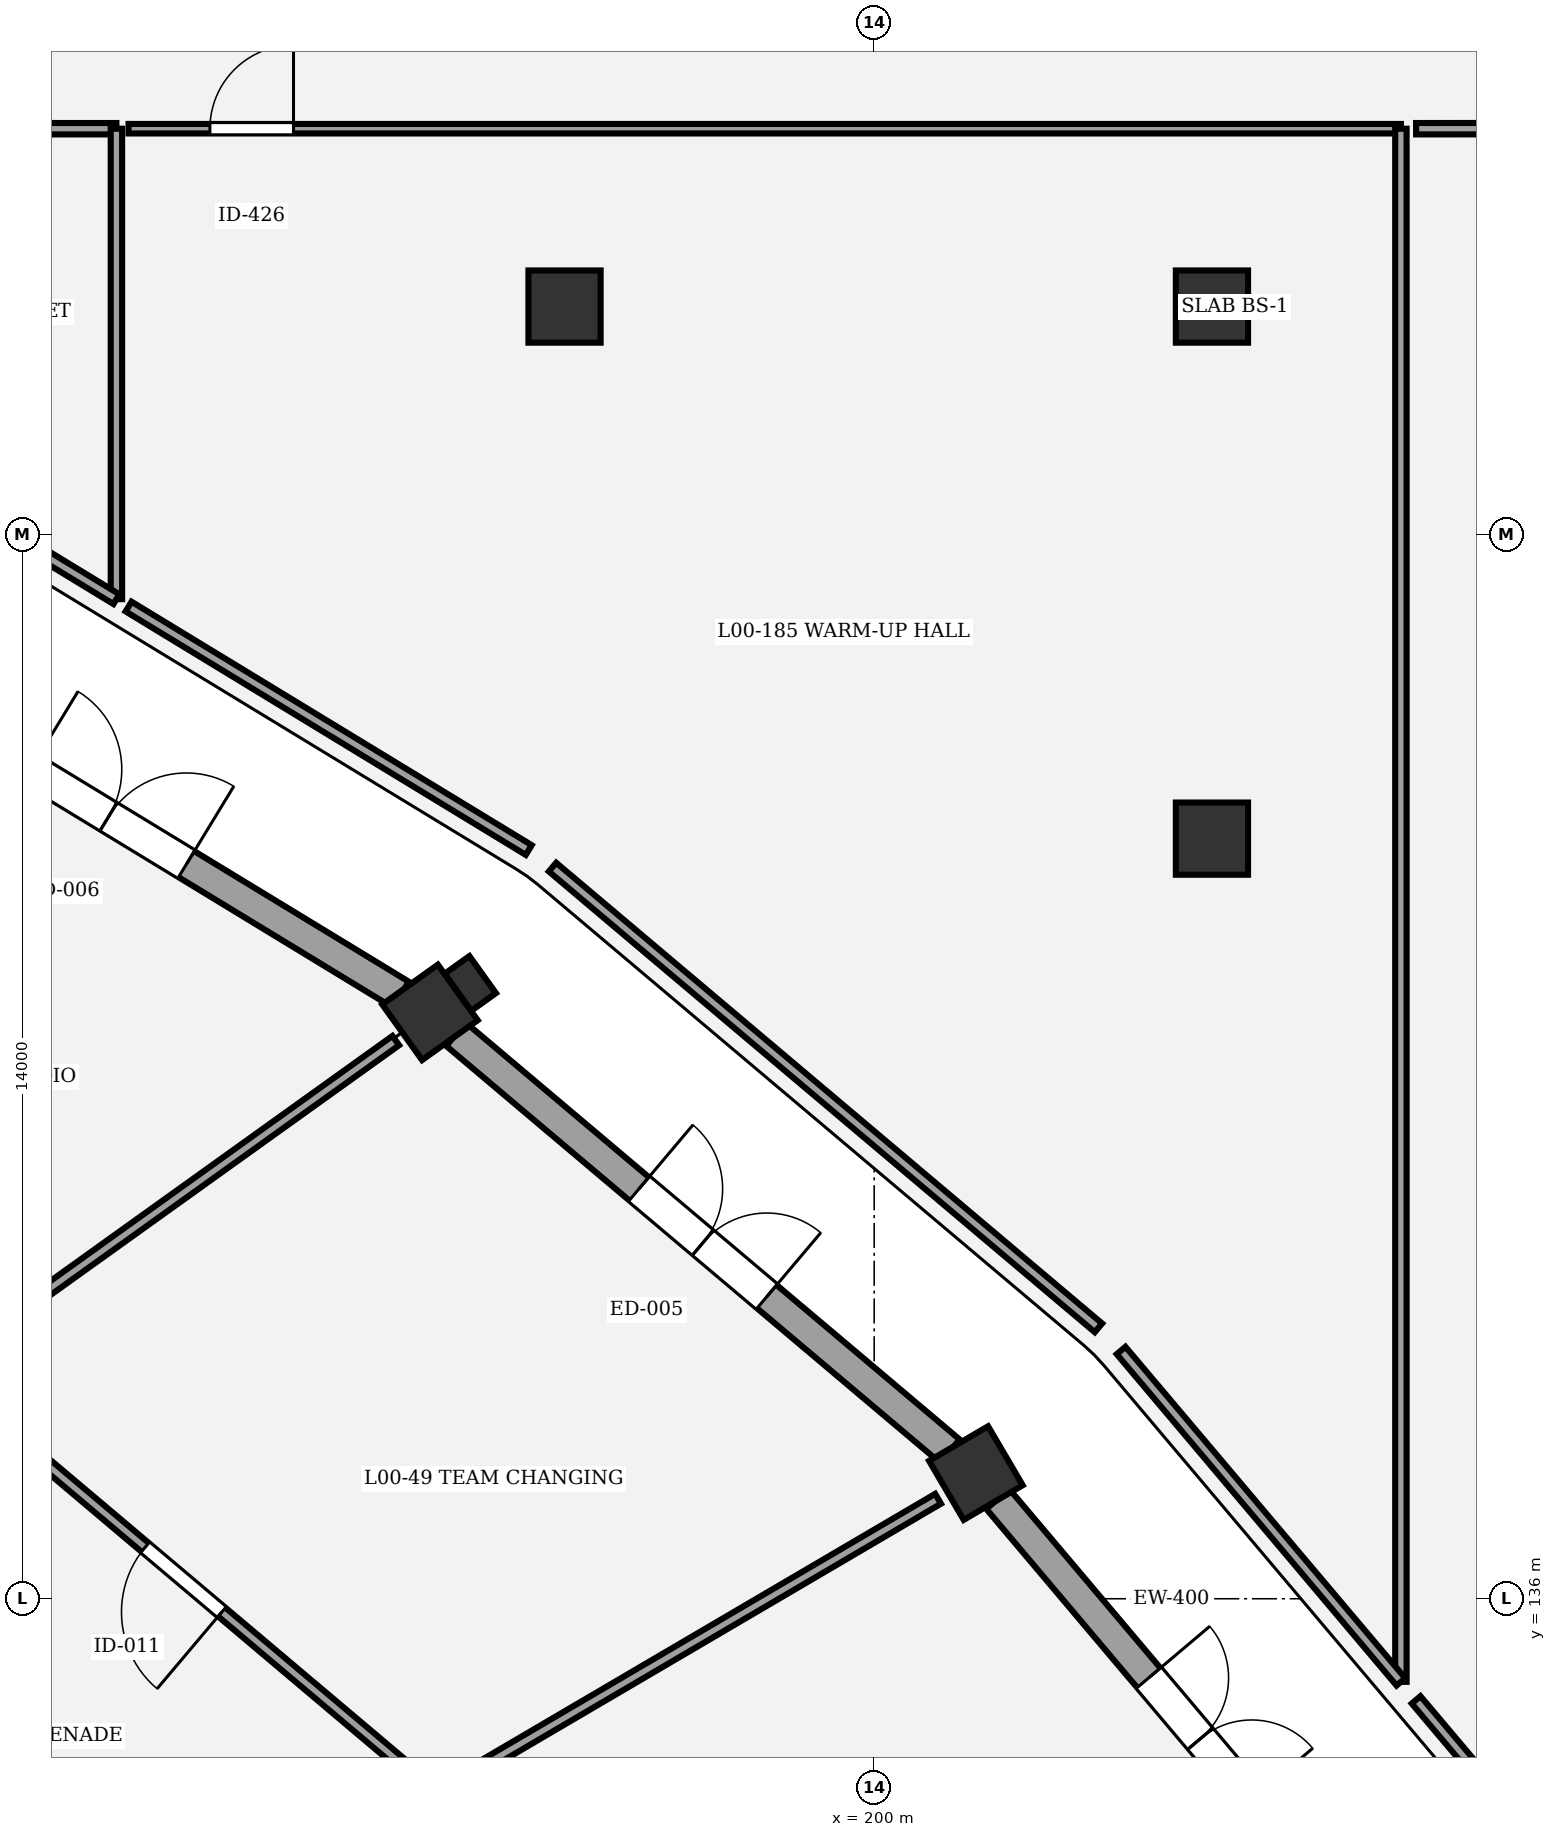
"""IFC4 building model, lengths in metres.
Left out: names, types, materials, properties, quantities, classifications, styles, units other than length and angle.
Written with IfcOpenShell. Run it as: python <this file> out.ifc"""

import sys

from ifc_helpers import new_model, si_unit, direction, frame, frame_2d, origin, origin_2d, place, context, subcontext, project, spatial, rectangle, circle, extrude, element, fill, save


model = new_model("IFC4")
c1 = context("Model", 3, precision=1e-05, world=origin(), true_north=direction((0.0, 1.0)))
c2 = subcontext(c1, "Body", "Model", "MODEL_VIEW")
j1 = project(units=[si_unit("LENGTHUNIT", "METRE"), si_unit("PLANEANGLEUNIT", "RADIAN")], contexts=[c1])
p1 = place(None, origin())
s1 = spatial("IfcSite", under=j1, at=p1, CompositionType="ELEMENT")
p2 = place(p1, origin())
s2 = spatial("IfcBuilding", under=s1, at=p2, CompositionType="ELEMENT")
p3 = place(p2, origin())
s3 = spatial("IfcBuildingStorey", under=s2, at=p3, CompositionType="ELEMENT", Elevation=0.0)
for number, where, z_axis, x_axis in (
    (1, (201.338, 137.654, 0.0), (0.0, 0.0, 1.0), (0.863, 0.506, 0.0)),
    (2, (194.156, 143.715, 0.0), (0.0, 0.0, 1.0), (0.813, 0.582, 0.0)),
):
    element("IfcColumn", number, at=place(p3, frame(where, z_axis=z_axis, x_axis=x_axis)), inside=s3, PredefinedType="COLUMN", context=c2, shape_type="SweptSolid", body=[
        extrude(rectangle(XDim=0.9, YDim=0.9, at=origin_2d()), origin(), (0.0, 0.0, 1.0), 5.4),
    ])
p4 = place(p3, frame((194.686, 144.095, 0.0), z_axis=(0.0, 0.0, 1.0), x_axis=(-0.582406760395, 0.812897512265, 0.0)))
e3 = element("IfcColumn", 3, at=p4, inside=s3, PredefinedType="PILASTER", context=c2, shape_type="SweptSolid", body=[
    extrude(rectangle(XDim=0.6, YDim=0.4, at=origin_2d()), origin(), (0.0, 0.0, 1.0), 5.4),
])
for number, where, z_axis, x_axis in (
    (4, (195.926, 153.0, 0.0), (0.0, 0.0, 1.0), (1.0, 0.0, 0.0)),
    (5, (204.444, 146.0, 0.0), (0.0, 0.0, 1.0), (1.0, 0.0, 0.0)),
    (6, (204.444, 153.0, 0.0), (0.0, 0.0, 1.0), (1.0, 0.0, 0.0)),
):
    element("IfcColumn", number, at=place(p3, frame(where, z_axis=z_axis, x_axis=x_axis)), inside=s3, PredefinedType="COLUMN", context=c2, shape_type="SweptSolid", body=[
        extrude(circle(Radius=0.475, at=origin_2d()), origin(), (0.0, 0.0, 1.0), 5.4),
    ])
p5 = place(p3, frame((201.627, 137.311, 0.0), z_axis=(0.0, 0.0, 1.0), x_axis=(0.645194244502, -0.764018577563, 0.0)))
e7 = element("IfcWall", 7, at=p5, inside=s3, PredefinedType="STANDARD", context=c2, shape_type="SweptSolid", body=[
    extrude(rectangle(XDim=8.256, YDim=0.4, at=frame_2d((4.128, 0.0))), origin(), (0.0, 0.0, 1.0), 4.25),
])
p6 = place(p5, frame((3.078, 0.0, 0.0)))
e8 = element("IfcOpeningElement", 8, at=p6, cuts=e7, PredefinedType="OPENING", context=c2, shape_type="SweptSolid", body=[
    extrude(rectangle(XDim=2.1, YDim=2.45, at=frame_2d((1.05, 1.225))), frame((0.0, 0.21, 0.0), z_axis=(0.0, -1.0, 0.0), x_axis=(1.0, 0.0, 0.0)), (0.0, 0.0, 1.0), 0.42),
])
p7 = place(p3, frame((194.498, 143.426, 0.0), z_axis=(0.0, 0.0, 1.0), x_axis=(0.764254773348, -0.644914445035, 0.0)))
e9 = element("IfcWall", 9, at=p7, inside=s3, PredefinedType="STANDARD", context=c2, shape_type="SweptSolid", body=[
    extrude(rectangle(XDim=8.502, YDim=0.4, at=frame_2d((4.251, 0.0))), origin(), (0.0, 0.0, 1.0), 4.25),
])
p8 = place(p7, frame((3.151, 0.0, 0.0)))
e10 = element("IfcOpeningElement", 10, at=p8, cuts=e9, PredefinedType="OPENING", context=c2, shape_type="SweptSolid", body=[
    extrude(rectangle(XDim=2.2, YDim=2.5, at=frame_2d((1.1, 1.25))), frame((0.0, 0.21, 0.0), z_axis=(0.0, -1.0, 0.0), x_axis=(1.0, 0.0, 0.0)), (0.0, 0.0, 1.0), 0.42),
])
p9 = place(p3, frame((186.079, 148.628, 0.0), z_axis=(0.0, 0.0, 1.0), x_axis=(0.854319454423, -0.519748275413, 0.0)))
e11 = element("IfcWall", 11, at=p9, inside=s3, PredefinedType="STANDARD", context=c2, shape_type="SweptSolid", body=[
    extrude(rectangle(XDim=9.006, YDim=0.4, at=frame_2d((4.503, 0.0))), origin(), (0.0, 0.0, 1.0), 4.25),
])
p10 = place(p9, frame((3.303, 0.0, 0.0)))
e12 = element("IfcOpeningElement", 12, at=p10, cuts=e11, PredefinedType="OPENING", context=c2, shape_type="SweptSolid", body=[
    extrude(rectangle(XDim=2.4, YDim=2.55, at=frame_2d((1.2, 1.275))), frame((0.0, 0.21, 0.0), z_axis=(0.0, -1.0, 0.0), x_axis=(1.0, 0.0, 0.0)), (0.0, 0.0, 1.0), 0.42),
])
p11 = place(p3, frame((194.175, 133.497, 0.0), z_axis=(0.0, 0.0, 1.0), x_axis=(-0.764257572309, 0.644911128117, 0.0)))
e13 = element("IfcWall", 13, at=p11, inside=s3, PredefinedType="PARTITIONING", context=c2, shape_type="SweptSolid", body=[
    extrude(rectangle(XDim=8.539, YDim=0.15, at=frame_2d((4.269, 0.0))), origin(), (0.0, 0.0, 1.0), 4.15),
])
p12 = place(p11, frame((3.609, 0.0, 0.0)))
e14 = element("IfcOpeningElement", 14, at=p12, cuts=e13, PredefinedType="OPENING", context=c2, shape_type="SweptSolid", body=[
    extrude(rectangle(XDim=1.32, YDim=2.1, at=frame_2d((0.66, 1.05))), frame((0.0, 0.085, 0.0), z_axis=(0.0, -1.0, 0.0), x_axis=(1.0, 0.0, 0.0)), (0.0, 0.0, 1.0), 0.17),
])
p13 = place(p3, frame((184.61, 155.34, 0.0), z_axis=(0.0, 0.0, 1.0), x_axis=(1.0, 0.0, 0.0)))
e15 = element("IfcWall", 15, at=p13, inside=s3, PredefinedType="PARTITIONING", context=c2, shape_type="SweptSolid", body=[
    extrude(rectangle(XDim=5.42, YDim=0.15, at=frame_2d((2.71, 0.0))), origin(), (0.0, 0.0, 1.0), 4.15),
])
p14 = place(p13, frame((0.506, 0.0, 0.0)))
e16 = element("IfcOpeningElement", 16, at=p14, cuts=e15, PredefinedType="OPENING", context=c2, shape_type="SweptSolid", body=[
    extrude(rectangle(XDim=1.06, YDim=2.3, at=frame_2d((0.53, 1.15))), frame((0.0, 0.085, 0.0), z_axis=(0.0, -1.0, 0.0), x_axis=(1.0, 0.0, 0.0)), (0.0, 0.0, 1.0), 0.17),
])
p15 = place(p3, frame((190.19, 155.34, 0.0), z_axis=(0.0, 0.0, 1.0), x_axis=(1.0, 0.0, 0.0)))
e17 = element("IfcWall", 17, at=p15, inside=s3, PredefinedType="PARTITIONING", context=c2, shape_type="SweptSolid", body=[
    extrude(rectangle(XDim=16.74, YDim=0.125, at=frame_2d((8.37, 0.0))), origin(), (0.0, 0.0, 1.0), 4.15),
])
p16 = place(p15, frame((1.07, 0.0, 0.0)))
e18 = element("IfcOpeningElement", 18, at=p16, cuts=e17, PredefinedType="OPENING", context=c2, shape_type="SweptSolid", body=[
    extrude(rectangle(XDim=1.1, YDim=2.3, at=frame_2d((0.55, 1.15))), frame((0.0, 0.073, 0.0), z_axis=(0.0, -1.0, 0.0), x_axis=(1.0, 0.0, 0.0)), (0.0, 0.0, 1.0), 0.145),
])
p17 = place(p3, frame((194.232, 133.438, 0.0), z_axis=(0.0, 0.0, 1.0), x_axis=(0.862520085009, 0.506022828492, 0.0)))
e19 = element("IfcWall", 19, at=p17, inside=s3, PredefinedType="PARTITIONING", context=c2, shape_type="SweptSolid", body=[
    extrude(rectangle(XDim=7.663, YDim=0.15, at=frame_2d((3.831, 0.0))), origin(), (0.0, 0.0, 1.0), 4.15),
])
p18 = place(p3, frame((187.649, 139.004, 0.0), z_axis=(0.0, 0.0, 1.0), x_axis=(0.812884613266, 0.582424763824, 0.0)))
e20 = element("IfcWall", 20, at=p18, inside=s3, PredefinedType="PARTITIONING", context=c2, shape_type="SweptSolid", body=[
    extrude(rectangle(XDim=7.45, YDim=0.15, at=frame_2d((3.725, 0.0))), origin(), (0.0, 0.0, 1.0), 4.15),
])
p19 = place(p3, frame((190.03, 155.34, 0.0), z_axis=(0.0, 0.0, 1.0), x_axis=(0.0, -1.0, 0.0)))
e21 = element("IfcWall", 21, at=p19, inside=s3, PredefinedType="PARTITIONING", context=c2, shape_type="SweptSolid", body=[
    extrude(rectangle(XDim=6.189, YDim=0.15, at=frame_2d((3.095, 0.0))), origin(), (0.0, 0.0, 1.0), 4.15),
])
p20 = place(p3, frame((190.03, 149.151, 0.0), z_axis=(0.0, 0.0, 1.0), x_axis=(-0.854335242099, 0.519722324042, 0.0)))
e22 = element("IfcWall", 22, at=p20, inside=s3, PredefinedType="PARTITIONING", context=c2, shape_type="SweptSolid", body=[
    extrude(rectangle(XDim=3.552, YDim=0.15, at=frame_2d((1.776, 0.0))), origin(), (0.0, 0.0, 1.0), 4.15),
])
p21 = place(p3, frame((202.951, 139.564, 0.0), z_axis=(0.0, 0.0, 1.0), x_axis=(-0.76426547638, 0.644901761212, 0.0)))
e23 = element("IfcWall", 23, at=p21, inside=s3, PredefinedType="PARTITIONING", context=c2, shape_type="SweptSolid", body=[
    extrude(rectangle(XDim=9.398, YDim=0.15, at=frame_2d((4.699, 0.0))), origin(), (0.0, 0.0, 1.0), 4.15),
])
p22 = place(p3, frame((195.455, 145.85, 0.0), z_axis=(0.0, 0.0, 1.0), x_axis=(-0.854341575167, 0.519711913411, 0.0)))
e24 = element("IfcWall", 24, at=p22, inside=s3, PredefinedType="PARTITIONING", context=c2, shape_type="SweptSolid", body=[
    extrude(rectangle(XDim=6.163, YDim=0.15, at=frame_2d((3.082, 0.0))), origin(), (0.0, 0.0, 1.0), 4.15),
])
p23 = place(p3, frame((206.93, 155.34, 0.0), z_axis=(0.0, 0.0, 1.0), x_axis=(0.0, -1.0, 0.0)))
e25 = element("IfcWall", 25, at=p23, inside=s3, PredefinedType="PARTITIONING", context=c2, shape_type="SweptSolid", body=[
    extrude(rectangle(XDim=20.434, YDim=0.15, at=frame_2d((10.217, 0.0))), origin(), (0.0, 0.0, 1.0), 4.15),
])
p24 = place(p3, frame((206.93, 134.906, 0.0), z_axis=(0.0, 0.0, 1.0), x_axis=(-0.645178597855, 0.764031790484, 0.0)))
e26 = element("IfcWall", 26, at=p24, inside=s3, PredefinedType="PARTITIONING", context=c2, shape_type="SweptSolid", body=[
    extrude(rectangle(XDim=5.706, YDim=0.15, at=frame_2d((2.853, 0.0))), origin(), (0.0, 0.0, 1.0), 4.15),
])
p25 = place(p3, frame((209.153, 132.274, 0.0), z_axis=(0.0, 0.0, 1.0), x_axis=(-0.64518788911, 0.764023944485, 0.0)))
e27 = element("IfcWall", 27, at=p25, inside=s3, PredefinedType="PARTITIONING", context=c2, shape_type="SweptSolid", body=[
    extrude(rectangle(XDim=3.135, YDim=0.15, at=frame_2d((1.567, 0.0))), origin(), (0.0, 0.0, 1.0), 4.15),
])
p26 = place(p3, frame((207.13, 155.34, 0.0), z_axis=(0.0, 0.0, 1.0), x_axis=(0.999999951445, 0.000311623544, 0.0)))
e28 = element("IfcWall", 28, at=p26, inside=s3, PredefinedType="PARTITIONING", context=c2, shape_type="SweptSolid", body=[
    extrude(rectangle(XDim=9.401, YDim=0.15, at=frame_2d((4.701, 0.0))), origin(), (0.0, 0.0, 1.0), 4.15),
])
p27 = place(p6, origin())
e29 = element("IfcDoor", 29, at=p27, inside=s3, OperationType="DOUBLE_DOOR_SINGLE_SWING", PredefinedType="DOOR", context=c2, shape_type="SweptSolid", body=[
    extrude(rectangle(XDim=2.1, YDim=2.45, at=frame_2d((1.05, 1.225))), frame((0.0, 0.025, 0.0), z_axis=(0.0, -1.0, 0.0), x_axis=(1.0, 0.0, 0.0)), (0.0, 0.0, 1.0), 0.05),
])
fill(e8, e29)
p28 = place(p8, origin())
e30 = element("IfcDoor", 30, at=p28, inside=s3, OperationType="DOUBLE_DOOR_SINGLE_SWING", PredefinedType="DOOR", context=c2, shape_type="SweptSolid", body=[
    extrude(rectangle(XDim=2.2, YDim=2.5, at=frame_2d((1.1, 1.25))), frame((0.0, 0.025, 0.0), z_axis=(0.0, -1.0, 0.0), x_axis=(1.0, 0.0, 0.0)), (0.0, 0.0, 1.0), 0.05),
])
fill(e10, e30)
p29 = place(p10, origin())
e31 = element("IfcDoor", 31, at=p29, inside=s3, OperationType="DOUBLE_DOOR_SINGLE_SWING", PredefinedType="DOOR", context=c2, shape_type="SweptSolid", body=[
    extrude(rectangle(XDim=2.4, YDim=2.55, at=frame_2d((1.2, 1.275))), frame((0.0, 0.025, 0.0), z_axis=(0.0, -1.0, 0.0), x_axis=(1.0, 0.0, 0.0)), (0.0, 0.0, 1.0), 0.05),
])
fill(e12, e31)
p30 = place(p12, origin())
e32 = element("IfcDoor", 32, at=p30, inside=s3, OperationType="SINGLE_SWING_LEFT", PredefinedType="DOOR", context=c2, shape_type="SweptSolid", body=[
    extrude(rectangle(XDim=1.32, YDim=2.1, at=frame_2d((0.66, 1.05))), frame((0.0, 0.025, 0.0), z_axis=(0.0, -1.0, 0.0), x_axis=(1.0, 0.0, 0.0)), (0.0, 0.0, 1.0), 0.05),
])
fill(e14, e32)
p31 = place(p16, origin())
e33 = element("IfcDoor", 33, at=p31, inside=s3, OperationType="SINGLE_SWING_RIGHT", PredefinedType="DOOR", context=c2, shape_type="SweptSolid", body=[
    extrude(rectangle(XDim=1.1, YDim=2.3, at=frame_2d((0.55, 1.15))), frame((0.0, 0.025, 0.0), z_axis=(0.0, -1.0, 0.0), x_axis=(1.0, 0.0, 0.0)), (0.0, 0.0, 1.0), 0.05),
])
fill(e18, e33)
save(model, sys.argv[1])
